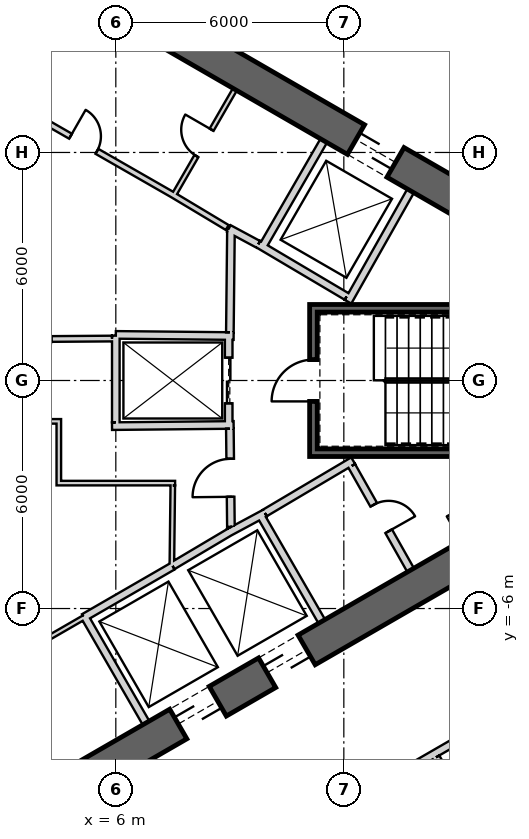
"""IFC4 building model, lengths in metres.
Left out: names, types, materials, properties, quantities, classifications, styles, units other than length and angle.
Written with IfcOpenShell. Run it as: python <this file> out.ifc"""

import sys

from ifc_helpers import new_model, si_unit, direction, frame, frame_2d, origin, place, context, subcontext, project, spatial, rectangle, extrude, element, fill, save


model = new_model("IFC4")
c1 = context("Model", 3, precision=1e-05, world=origin(), true_north=direction((0.0, 1.0)))
c2 = subcontext(c1, "Body", "Model", "MODEL_VIEW")
j1 = project(units=[si_unit("LENGTHUNIT", "METRE"), si_unit("PLANEANGLEUNIT", "RADIAN")], contexts=[c1])
p1 = place(None, origin())
s1 = spatial("IfcSite", under=j1, at=p1, CompositionType="ELEMENT")
p2 = place(p1, origin())
s2 = spatial("IfcBuilding", under=s1, at=p2, CompositionType="ELEMENT")
p3 = place(p2, frame((0.0, 0.0, 333.8)))
s3 = spatial("IfcBuildingStorey", under=s2, at=p3, CompositionType="ELEMENT", Elevation=333.8)
p4 = place(p3, frame((19.475, 2.208, 0.0), z_axis=(0.0, 0.0, 1.0), x_axis=(-0.866028369851, 0.499994862586, 0.0)))
e1 = element("IfcWall", 1, at=p4, inside=s3, PredefinedType="SHEAR", context=c2, shape_type="SweptSolid", body=[
    extrude(rectangle(XDim=31.523, YDim=0.9, at=frame_2d((15.762, 0.0))), origin(), (0.0, 0.0, 1.0), 3.9),
])
p5 = place(p4, frame((7.062, 0.0, 0.0)))
e2 = element("IfcOpeningElement", 2, at=p5, cuts=e1, PredefinedType="OPENING", context=c2, shape_type="SweptSolid", body=[
    extrude(rectangle(XDim=1.2, YDim=2.4, at=frame_2d((0.6, 1.2))), frame((0.0, 0.46, 0.0), z_axis=(0.0, -1.0, 0.0), x_axis=(1.0, 0.0, 0.0)), (0.0, 0.0, 1.0), 0.92),
])
p6 = place(p4, frame((3.612, 0.0, 0.0)))
e3 = element("IfcOpeningElement", 3, at=p6, cuts=e1, PredefinedType="OPENING", context=c2, shape_type="SweptSolid", body=[
    extrude(rectangle(XDim=1.2, YDim=2.4, at=frame_2d((0.6, 1.2))), frame((0.0, 0.46, 0.0), z_axis=(0.0, -1.0, 0.0), x_axis=(1.0, 0.0, 0.0)), (0.0, 0.0, 1.0), 0.92),
])
p7 = place(p4, frame((26.712, 0.0, 0.0)))
e4 = element("IfcOpeningElement", 4, at=p7, cuts=e1, PredefinedType="OPENING", context=c2, shape_type="SweptSolid", body=[
    extrude(rectangle(XDim=1.2, YDim=2.4, at=frame_2d((0.6, 1.2))), frame((0.0, 0.46, 0.0), z_axis=(0.0, -1.0, 0.0), x_axis=(1.0, 0.0, 0.0)), (0.0, 0.0, 1.0), 0.92),
])
p8 = place(p3, frame((-7.825, -17.97, 0.0), z_axis=(0.0, 0.0, 1.0), x_axis=(0.866028369851, 0.499994862586, 0.0)))
e5 = element("IfcWall", 5, at=p8, inside=s3, PredefinedType="SHEAR", context=c2, shape_type="SweptSolid", body=[
    extrude(rectangle(XDim=31.523, YDim=0.9, at=frame_2d((15.762, 0.0))), origin(), (0.0, 0.0, 1.0), 3.9),
])
p9 = place(p8, frame((17.862, 0.0, 0.0)))
e6 = element("IfcOpeningElement", 6, at=p9, cuts=e5, PredefinedType="OPENING", context=c2, shape_type="SweptSolid", body=[
    extrude(rectangle(XDim=1.2, YDim=2.4, at=frame_2d((0.6, 1.2))), frame((0.0, 0.46, 0.0), z_axis=(0.0, -1.0, 0.0), x_axis=(1.0, 0.0, 0.0)), (0.0, 0.0, 1.0), 0.92),
])
p10 = place(p8, frame((20.562, 0.0, 0.0)))
e7 = element("IfcOpeningElement", 7, at=p10, cuts=e5, PredefinedType="OPENING", context=c2, shape_type="SweptSolid", body=[
    extrude(rectangle(XDim=1.2, YDim=2.4, at=frame_2d((0.6, 1.2))), frame((0.0, 0.46, 0.0), z_axis=(0.0, -1.0, 0.0), x_axis=(1.0, 0.0, 0.0)), (0.0, 0.0, 1.0), 0.92),
])
p11 = place(p8, frame((26.712, 0.0, 0.0)))
e8 = element("IfcOpeningElement", 8, at=p11, cuts=e5, PredefinedType="OPENING", context=c2, shape_type="SweptSolid", body=[
    extrude(rectangle(XDim=1.2, YDim=2.4, at=frame_2d((0.6, 1.2))), frame((0.0, 0.46, 0.0), z_axis=(0.0, -1.0, 0.0), x_axis=(1.0, 0.0, 0.0)), (0.0, 0.0, 1.0), 0.92),
])
p12 = place(p8, frame((3.612, 0.0, 0.0)))
e9 = element("IfcOpeningElement", 9, at=p12, cuts=e5, PredefinedType="OPENING", context=c2, shape_type="SweptSolid", body=[
    extrude(rectangle(XDim=1.2, YDim=2.4, at=frame_2d((0.6, 1.2))), frame((0.0, 0.46, 0.0), z_axis=(0.0, -1.0, 0.0), x_axis=(1.0, 0.0, 0.0)), (0.0, 0.0, 1.0), 0.92),
])
p13 = place(p3, frame((9.847, 3.495, 0.0), z_axis=(0.0, 0.0, 1.0), x_axis=(0.499984717929, 0.866034226713, 0.0)))
e10 = element("IfcWall", 10, at=p13, inside=s3, PredefinedType="PLUMBINGWALL", context=c2, shape_type="SweptSolid", body=[
    extrude(rectangle(XDim=3.25, YDim=0.2, at=frame_2d((1.625, 0.0))), origin(), (0.0, 0.0, 1.0), 3.6),
])
p14 = place(p3, frame((12.11, 2.073, 0.0), z_axis=(0.0, 0.0, 1.0), x_axis=(0.49196600604, 0.870614408852, 0.0)))
e11 = element("IfcWall", 11, at=p14, inside=s3, PredefinedType="PLUMBINGWALL", context=c2, shape_type="SweptSolid", body=[
    extrude(rectangle(XDim=3.35, YDim=0.2, at=frame_2d((1.675, 0.0))), origin(), (0.0, 0.0, 1.0), 3.6),
])
p15 = place(p3, frame((12.073, 2.211, 0.0), z_axis=(0.0, 0.0, 1.0), x_axis=(-0.860414880418, 0.509594185166, 0.0)))
e12 = element("IfcWall", 12, at=p15, inside=s3, PredefinedType="PLUMBINGWALL", context=c2, shape_type="SweptSolid", body=[
    extrude(rectangle(XDim=2.7, YDim=0.2, at=frame_2d((1.35, 0.0))), origin(), (0.0, 0.0, 1.0), 3.6),
])
p16 = place(p3, frame((6.795, -9.01, 0.0), z_axis=(0.0, 0.0, 1.0), x_axis=(-0.499984717929, 0.866034226713, 0.0)))
e13 = element("IfcWall", 13, at=p16, inside=s3, PredefinedType="PLUMBINGWALL", context=c2, shape_type="SweptSolid", body=[
    extrude(rectangle(XDim=3.25, YDim=0.2, at=frame_2d((1.625, 0.0))), origin(), (0.0, 0.0, 1.0), 3.6),
])
p17 = place(p3, frame((5.159, -6.236, 0.0), z_axis=(0.0, 0.0, 1.0), x_axis=(0.866036505625, 0.499980770555, 0.0)))
e14 = element("IfcWall", 14, at=p17, inside=s3, PredefinedType="PLUMBINGWALL", context=c2, shape_type="SweptSolid", body=[
    extrude(rectangle(XDim=2.7, YDim=0.2, at=frame_2d((1.35, 0.0))), origin(), (0.0, 0.0, 1.0), 3.6),
])
p18 = place(p3, frame((9.795, -3.525, 0.0), z_axis=(0.0, 0.0, 1.0), x_axis=(0.499984717929, -0.866034226713, 0.0)))
e15 = element("IfcWall", 15, at=p18, inside=s3, PredefinedType="PLUMBINGWALL", context=c2, shape_type="SweptSolid", body=[
    extrude(rectangle(XDim=3.25, YDim=0.2, at=frame_2d((1.625, 0.0))), origin(), (0.0, 0.0, 1.0), 3.6),
])
p19 = place(p3, frame((8.974, -3.999, 0.0), z_axis=(0.0, 0.0, 1.0), x_axis=(0.880907015104, 0.473289373154, 0.0)))
e16 = element("IfcWall", 16, at=p19, inside=s3, PredefinedType="PLUMBINGWALL", context=c2, shape_type="SweptSolid", body=[
    extrude(rectangle(XDim=1.078, YDim=0.2, at=frame_2d((0.539, 0.0))), origin(), (0.0, 0.0, 1.0), 3.6),
])
p20 = place(p3, frame((7.493, -4.878, 0.0), z_axis=(0.0, 0.0, 1.0), x_axis=(0.859981807212, 0.510324691999, 0.0)))
e17 = element("IfcWall", 17, at=p20, inside=s3, PredefinedType="PLUMBINGWALL", context=c2, shape_type="SweptSolid", body=[
    extrude(rectangle(XDim=1.845, YDim=0.2, at=frame_2d((0.922, 0.0))), origin(), (0.0, 0.0, 1.0), 3.6),
])
p21 = place(p3, frame((19.2, 1.9, -0.3), z_axis=(0.0, 0.0, 1.0), x_axis=(-1.0, 0.0, 0.0)))
e18 = element("IfcWall", 18, at=p21, inside=s3, PredefinedType="SHEAR", context=c2, shape_type="SweptSolid", body=[
    extrude(rectangle(XDim=8.1, YDim=0.2, at=frame_2d((4.05, 0.0))), origin(), (0.0, 0.0, 1.0), 3.9),
])
p22 = place(p3, frame((11.1, -1.9, -0.3), z_axis=(0.0, 0.0, 1.0), x_axis=(1.0, 0.0, 0.0)))
e19 = element("IfcWall", 19, at=p22, inside=s3, PredefinedType="SHEAR", context=c2, shape_type="SweptSolid", body=[
    extrude(rectangle(XDim=7.9, YDim=0.2, at=frame_2d((3.95, 0.0))), origin(), (0.0, 0.0, 1.0), 3.9),
])
p23 = place(p3, frame((11.2, -1.8, -0.3), z_axis=(0.0, 0.0, 1.0), x_axis=(0.0, 1.0, 0.0)))
e20 = element("IfcWall", 20, at=p23, inside=s3, PredefinedType="SHEAR", context=c2, shape_type="SweptSolid", body=[
    extrude(rectangle(XDim=3.6, YDim=0.2, at=frame_2d((1.8, 0.0))), origin(), (0.0, 0.0, 1.0), 3.9),
])
p24 = place(p23, frame((1.25, 0.0, 0.3)))
e21 = element("IfcOpeningElement", 21, at=p24, cuts=e20, PredefinedType="OPENING", context=c2, shape_type="SweptSolid", body=[
    extrude(rectangle(XDim=1.1, YDim=2.1, at=frame_2d((0.55, 1.05))), frame((0.0, 0.11, 0.0), z_axis=(0.0, -1.0, 0.0), x_axis=(1.0, 0.0, 0.0)), (0.0, 0.0, 1.0), 0.22),
])
p25 = place(p3, frame((8.97, 1.2, 0.0), z_axis=(0.0, 0.0, 1.0), x_axis=(0.0, -1.0, 0.0)))
e22 = element("IfcWall", 22, at=p25, inside=s3, PredefinedType="PLUMBINGWALL", context=c2, shape_type="SweptSolid", body=[
    extrude(rectangle(XDim=2.4, YDim=0.2, at=frame_2d((1.2, 0.0))), origin(), (0.0, 0.0, 1.0), 3.6),
])
p26 = place(p25, frame((0.6, 0.0, 0.0)))
e23 = element("IfcOpeningElement", 23, at=p26, cuts=e22, PredefinedType="OPENING", context=c2, shape_type="SweptSolid", body=[
    extrude(rectangle(XDim=1.2, YDim=2.4, at=frame_2d((0.6, 1.2))), frame((0.0, 0.11, 0.0), z_axis=(0.0, -1.0, 0.0), x_axis=(1.0, 0.0, 0.0)), (0.0, 0.0, 1.0), 0.22),
])
p27 = place(p3, frame((6.0, 1.2, 0.0), z_axis=(0.0, 0.0, 1.0), x_axis=(0.999949988, -0.010001074852, 0.0)))
e24 = element("IfcWall", 24, at=p27, inside=s3, PredefinedType="PLUMBINGWALL", context=c2, shape_type="SweptSolid", body=[
    extrude(rectangle(XDim=3.1, YDim=0.2, at=frame_2d((1.55, 0.0))), origin(), (0.0, 0.0, 1.0), 3.6),
])
p28 = place(p3, frame((5.9, -1.201, 0.0), z_axis=(0.0, 0.0, 1.0), x_axis=(0.999950064753, 0.009993397809, 0.0)))
e25 = element("IfcWall", 25, at=p28, inside=s3, PredefinedType="PLUMBINGWALL", context=c2, shape_type="SweptSolid", body=[
    extrude(rectangle(XDim=3.2, YDim=0.2, at=frame_2d((1.6, 0.0))), origin(), (0.0, 0.0, 1.0), 3.6),
])
p29 = place(p3, frame((6.0, -1.1, 0.0), z_axis=(0.0, 0.0, 1.0), x_axis=(0.0, 1.0, 0.0)))
e26 = element("IfcWall", 26, at=p29, inside=s3, PredefinedType="PLUMBINGWALL", context=c2, shape_type="SweptSolid", body=[
    extrude(rectangle(XDim=2.28, YDim=0.2, at=frame_2d((1.14, 0.0))), origin(), (0.0, 0.0, 1.0), 3.6),
])
p30 = place(p3, frame((7.508, 4.845, 0.0), z_axis=(0.0, 0.0, 1.0), x_axis=(0.500017246033, 0.866015446554, 0.0)))
e27 = element("IfcWall", 27, at=p30, inside=s3, PredefinedType="PARTITIONING", context=c2, shape_type="SweptSolid", body=[
    extrude(rectangle(XDim=3.25, YDim=0.12, at=frame_2d((1.625, 0.0))), origin(), (0.0, 0.0, 1.0), 3.6),
])
p31 = place(p30, frame((1.225, 0.0, 0.0)))
e28 = element("IfcOpeningElement", 28, at=p31, cuts=e27, PredefinedType="OPENING", context=c2, shape_type="SweptSolid", body=[
    extrude(rectangle(XDim=0.8, YDim=2.1, at=frame_2d((0.4, 1.05))), frame((0.0, 0.07, 0.0), z_axis=(0.0, -1.0, 0.0), x_axis=(1.0, 0.0, 0.0)), (0.0, 0.0, 1.0), 0.14),
])
p32 = place(p3, frame((8.974, 3.999, 0.0), z_axis=(0.0, 0.0, 1.0), x_axis=(0.880917147855, -0.473270513147, 0.0)))
e29 = element("IfcWall", 29, at=p32, inside=s3, PredefinedType="PARTITIONING", context=c2, shape_type="SweptSolid", body=[
    extrude(rectangle(XDim=0.878, YDim=0.2, at=frame_2d((0.439, 0.0))), origin(), (0.0, 0.0, 1.0), 3.6),
])
p33 = place(p3, frame((8.931, 4.026, 0.0), z_axis=(0.0, 0.0, 1.0), x_axis=(-0.857531586833, 0.514431314738, 0.0)))
e30 = element("IfcWall", 30, at=p33, inside=s3, PredefinedType="PLUMBINGWALL", context=c2, shape_type="SweptSolid", body=[
    extrude(rectangle(XDim=1.671, YDim=0.15, at=frame_2d((0.836, 0.0))), origin(), (0.0, 0.0, 1.0), 3.6),
])
p34 = place(p3, frame((2.832, 7.545, 0.0), z_axis=(0.0, 0.0, 1.0), x_axis=(0.500017246033, 0.866015446554, 0.0)))
e31 = element("IfcWall", 31, at=p34, inside=s3, PredefinedType="PARTITIONING", context=c2, shape_type="SweptSolid", body=[
    extrude(rectangle(XDim=3.25, YDim=0.12, at=frame_2d((1.625, 0.0))), origin(), (0.0, 0.0, 1.0), 3.6),
])
p35 = place(p34, frame((1.225, 0.0, 0.0)))
e32 = element("IfcOpeningElement", 32, at=p35, cuts=e31, PredefinedType="OPENING", context=c2, shape_type="SweptSolid", body=[
    extrude(rectangle(XDim=0.8, YDim=2.1, at=frame_2d((0.4, 1.05))), frame((0.0, 0.07, 0.0), z_axis=(0.0, -1.0, 0.0), x_axis=(1.0, 0.0, 0.0)), (0.0, 0.0, 1.0), 0.14),
])
p36 = place(p3, frame((7.497, 4.886, 0.0), z_axis=(0.0, 0.0, 1.0), x_axis=(-0.867541725638, 0.497364407931, 0.0)))
e33 = element("IfcWall", 33, at=p36, inside=s3, PredefinedType="PLUMBINGWALL", context=c2, shape_type="SweptSolid", body=[
    extrude(rectangle(XDim=9.822, YDim=0.15, at=frame_2d((4.911, 0.0))), origin(), (0.0, 0.0, 1.0), 3.6),
])
p37 = place(p36, frame((2.3, 0.0, 0.0)))
e34 = element("IfcOpeningElement", 34, at=p37, cuts=e33, PredefinedType="OPENING", context=c2, shape_type="SweptSolid", body=[
    extrude(rectangle(XDim=0.8, YDim=2.1, at=frame_2d((0.4, 1.05))), frame((0.0, 0.085, 0.0), z_axis=(0.0, -1.0, 0.0), x_axis=(1.0, 0.0, 0.0)), (0.0, 0.0, 1.0), 0.17),
])
p38 = place(p3, frame((0.483, -8.936, 0.0), z_axis=(0.0, 0.0, 1.0), x_axis=(0.866028230842, 0.499995103361, 0.0)))
e35 = element("IfcWall", 35, at=p38, inside=s3, PredefinedType="PARTITIONING", context=c2, shape_type="SweptSolid", body=[
    extrude(rectangle(XDim=5.4, YDim=0.12, at=frame_2d((2.7, 0.0))), origin(), (0.0, 0.0, 1.0), 3.6),
])
p39 = place(p38, frame((2.3, 0.0, 0.0)))
e36 = element("IfcOpeningElement", 36, at=p39, cuts=e35, PredefinedType="OPENING", context=c2, shape_type="SweptSolid", body=[
    extrude(rectangle(XDim=0.8, YDim=2.1, at=frame_2d((0.4, 1.05))), frame((0.0, 0.07, 0.0), z_axis=(0.0, -1.0, 0.0), x_axis=(1.0, 0.0, 0.0)), (0.0, 0.0, 1.0), 0.14),
])
p40 = place(p3, frame((12.245, -2.109, 0.0), z_axis=(0.0, 0.0, 1.0), x_axis=(-0.860414880418, -0.509594185166, 0.0)))
e37 = element("IfcWall", 37, at=p40, inside=s3, PredefinedType="PARTITIONING", context=c2, shape_type="SweptSolid", body=[
    extrude(rectangle(XDim=2.7, YDim=0.2, at=frame_2d((1.35, 0.0))), origin(), (0.0, 0.0, 1.0), 3.6),
])
p41 = place(p3, frame((13.758, -4.99, 0.0), z_axis=(0.0, 0.0, 1.0), x_axis=(-0.491993409184, 0.87059892334, 0.0)))
e38 = element("IfcWall", 38, at=p41, inside=s3, PredefinedType="PARTITIONING", context=c2, shape_type="SweptSolid", body=[
    extrude(rectangle(XDim=3.15, YDim=0.2, at=frame_2d((1.575, 0.0))), origin(), (0.0, 0.0, 1.0), 3.6),
])
p42 = place(p41, frame((1.175, 0.0, 0.0)))
e39 = element("IfcOpeningElement", 39, at=p42, cuts=e38, PredefinedType="OPENING", context=c2, shape_type="SweptSolid", body=[
    extrude(rectangle(XDim=0.8, YDim=2.1, at=frame_2d((0.4, 1.05))), frame((0.0, 0.11, 0.0), z_axis=(0.0, -1.0, 0.0), x_axis=(1.0, 0.0, 0.0)), (0.0, 0.0, 1.0), 0.22),
])
p43 = place(p3, frame((9.001, 1.27, 0.0), z_axis=(0.0, 0.0, 1.0), x_axis=(0.010751103362, 0.999942205218, 0.0)))
e40 = element("IfcWall", 40, at=p43, inside=s3, PredefinedType="PARTITIONING", context=c2, shape_type="SweptSolid", body=[
    extrude(rectangle(XDim=2.725, YDim=0.2, at=frame_2d((1.363, 0.0))), origin(), (0.0, 0.0, 1.0), 3.6),
])
p44 = place(p3, frame((9.029, -3.851, 0.0), z_axis=(0.0, 0.0, 1.0), x_axis=(-0.010783593937, 0.99994185536, 0.0)))
e41 = element("IfcWall", 41, at=p44, inside=s3, PredefinedType="PARTITIONING", context=c2, shape_type="SweptSolid", body=[
    extrude(rectangle(XDim=2.581, YDim=0.2, at=frame_2d((1.291, 0.0))), origin(), (0.0, 0.0, 1.0), 3.6),
])
p45 = place(p44, frame((0.791, 0.0, 0.0)))
e42 = element("IfcOpeningElement", 42, at=p45, cuts=e41, PredefinedType="OPENING", context=c2, shape_type="SweptSolid", body=[
    extrude(rectangle(XDim=1.0, YDim=2.1, at=frame_2d((0.5, 1.05))), frame((0.0, 0.11, 0.0), z_axis=(0.0, -1.0, 0.0), x_axis=(1.0, 0.0, 0.0)), (0.0, 0.0, 1.0), 0.22),
])
p46 = place(p3, frame((1.778, 1.074, 0.0), z_axis=(0.0, 0.0, 1.0), x_axis=(0.999973898196, 0.007225159347, 0.0)))
e43 = element("IfcWall", 43, at=p46, inside=s3, PredefinedType="PLUMBINGWALL", context=c2, shape_type="SweptSolid", body=[
    extrude(rectangle(XDim=4.122, YDim=0.15, at=frame_2d((2.061, 0.0))), origin(), (0.0, 0.0, 1.0), 3.6),
])
p47 = place(p46, frame((1.725, 0.0, 0.0)))
e44 = element("IfcOpeningElement", 44, at=p47, cuts=e43, PredefinedType="OPENING", context=c2, shape_type="SweptSolid", body=[
    extrude(rectangle(XDim=0.8, YDim=2.1, at=frame_2d((0.4, 1.05))), frame((0.0, 0.085, 0.0), z_axis=(0.0, -1.0, 0.0), x_axis=(1.0, 0.0, 0.0)), (0.0, 0.0, 1.0), 0.17),
])
p48 = place(p3, frame((4.56, -1.075, 0.0), z_axis=(0.0, 0.0, 1.0), x_axis=(-1.0, 0.0, 0.0)))
e45 = element("IfcWall", 45, at=p48, inside=s3, PredefinedType="PARTITIONING", context=c2, shape_type="SweptSolid", body=[
    extrude(rectangle(XDim=2.636, YDim=0.12, at=frame_2d((1.318, 0.0))), origin(), (0.0, 0.0, 1.0), 3.6),
])
p49 = place(p3, frame((4.5, -2.76, 0.0), z_axis=(0.0, 0.0, 1.0), x_axis=(0.0, 1.0, 0.0)))
e46 = element("IfcWall", 46, at=p49, inside=s3, PredefinedType="PARTITIONING", context=c2, shape_type="SweptSolid", body=[
    extrude(rectangle(XDim=1.625, YDim=0.12, at=frame_2d((0.812, 0.0))), origin(), (0.0, 0.0, 1.0), 3.6),
])
p50 = place(p3, frame((7.56, -2.7, 0.0), z_axis=(0.0, 0.0, 1.0), x_axis=(-1.0, 0.0, 0.0)))
e47 = element("IfcWall", 47, at=p50, inside=s3, PredefinedType="PARTITIONING", context=c2, shape_type="SweptSolid", body=[
    extrude(rectangle(XDim=3.0, YDim=0.12, at=frame_2d((1.5, 0.0))), origin(), (0.0, 0.0, 1.0), 3.6),
])
p51 = place(p3, frame((7.475, -4.865, 0.0), z_axis=(0.0, 0.0, 1.0), x_axis=(0.011716133148, 0.999931363757, 0.0)))
e48 = element("IfcWall", 48, at=p51, inside=s3, PredefinedType="PARTITIONING", context=c2, shape_type="SweptSolid", body=[
    extrude(rectangle(XDim=2.105, YDim=0.12, at=frame_2d((1.052, 0.0))), origin(), (0.0, 0.0, 1.0), 3.6),
])
p52 = place(p3, frame((16.523, 8.358, 0.0), z_axis=(0.0, 0.0, 1.0), x_axis=(-0.866025545866, 0.499999753908, 0.0)))
e49 = element("IfcWall", 49, at=p52, inside=s3, PredefinedType="PARTITIONING", context=c2, shape_type="SweptSolid", body=[
    extrude(rectangle(XDim=26.471, YDim=0.2, at=frame_2d((13.235, 0.0))), origin(), (0.0, 0.0, 1.0), 2.97),
])
p53 = place(p52, frame((21.568, 0.0, 0.0)))
e50 = element("IfcOpeningElement", 50, at=p53, cuts=e49, PredefinedType="OPENING", context=c2, shape_type="SweptSolid", body=[
    extrude(rectangle(XDim=1.0, YDim=2.1, at=frame_2d((0.5, 1.05))), frame((0.0, 0.11, 0.0), z_axis=(0.0, -1.0, 0.0), x_axis=(1.0, 0.0, 0.0)), (0.0, 0.0, 1.0), 0.22),
])
p54 = place(p52, frame((8.333, 0.0, 0.0)))
e51 = element("IfcOpeningElement", 51, at=p54, cuts=e49, PredefinedType="OPENING", context=c2, shape_type="SweptSolid", body=[
    extrude(rectangle(XDim=1.0, YDim=2.1, at=frame_2d((0.5, 1.05))), frame((0.0, 0.11, 0.0), z_axis=(0.0, -1.0, 0.0), x_axis=(1.0, 0.0, 0.0)), (0.0, 0.0, 1.0), 0.22),
])
p55 = place(p3, frame((-6.505, -21.885, 0.0), z_axis=(0.0, 0.0, 1.0), x_axis=(0.86602457258, 0.500001439686, 0.0)))
e52 = element("IfcWall", 52, at=p55, inside=s3, PredefinedType="PARTITIONING", context=c2, shape_type="SweptSolid", body=[
    extrude(rectangle(XDim=32.952, YDim=0.2, at=frame_2d((16.476, 0.0))), origin(), (0.0, 0.0, 1.0), 2.97),
])
p56 = place(p55, frame((28.061, 0.0, 0.0)))
e53 = element("IfcOpeningElement", 53, at=p56, cuts=e52, PredefinedType="OPENING", context=c2, shape_type="SweptSolid", body=[
    extrude(rectangle(XDim=1.0, YDim=2.1, at=frame_2d((0.5, 1.05))), frame((0.0, 0.11, 0.0), z_axis=(0.0, -1.0, 0.0), x_axis=(1.0, 0.0, 0.0)), (0.0, 0.0, 1.0), 0.22),
])
p57 = place(p55, frame((16.137, 0.0, 0.0)))
e54 = element("IfcOpeningElement", 54, at=p57, cuts=e52, PredefinedType="OPENING", context=c2, shape_type="SweptSolid", body=[
    extrude(rectangle(XDim=1.0, YDim=2.1, at=frame_2d((0.5, 1.05))), frame((0.0, 0.11, 0.0), z_axis=(0.0, -1.0, 0.0), x_axis=(1.0, 0.0, 0.0)), (0.0, 0.0, 1.0), 0.22),
])
p58 = place(p55, frame((4.101, 0.0, 0.0)))
e55 = element("IfcOpeningElement", 55, at=p58, cuts=e52, PredefinedType="OPENING", context=c2, shape_type="SweptSolid", body=[
    extrude(rectangle(XDim=1.0, YDim=2.1, at=frame_2d((0.5, 1.05))), frame((0.0, 0.11, 0.0), z_axis=(0.0, -1.0, 0.0), x_axis=(1.0, 0.0, 0.0)), (0.0, 0.0, 1.0), 0.22),
])
p59 = place(p3, frame((14.425, -9.916, 0.0), z_axis=(0.0, 0.0, 1.0), x_axis=(0.499943167381, -0.866058213626, 0.0)))
e56 = element("IfcWall", 56, at=p59, inside=s3, PredefinedType="PARTITIONING", context=c2, shape_type="SweptSolid", body=[
    extrude(rectangle(XDim=11.458, YDim=0.2, at=frame_2d((5.729, 0.0))), origin(), (0.0, 0.0, 1.0), 3.07),
])
p60 = place(p24, origin())
e57 = element("IfcDoor", 57, at=p60, inside=s3, OperationType="SINGLE_SWING_RIGHT", PredefinedType="USERDEFINED", context=c2, shape_type="SweptSolid", body=[
    extrude(rectangle(XDim=1.1, YDim=2.1, at=frame_2d((0.55, 1.05))), frame((0.0, 0.025, 0.0), z_axis=(0.0, -1.0, 0.0), x_axis=(1.0, 0.0, 0.0)), (0.0, 0.0, 1.0), 0.05),
])
fill(e21, e57)
p61 = place(p45, origin())
e58 = element("IfcDoor", 58, at=p61, inside=s3, OperationType="SINGLE_SWING_RIGHT", PredefinedType="USERDEFINED", context=c2, shape_type="SweptSolid", body=[
    extrude(rectangle(XDim=1.0, YDim=2.1, at=frame_2d((0.5, 1.05))), frame((0.0, 0.025, 0.0), z_axis=(0.0, -1.0, 0.0), x_axis=(1.0, 0.0, 0.0)), (0.0, 0.0, 1.0), 0.05),
])
fill(e42, e58)
p62 = place(p26, origin())
e59 = element("IfcDoor", 59, at=p62, inside=s3, OperationType="SLIDING_TO_LEFT", PredefinedType="USERDEFINED", context=c2, shape_type="SweptSolid", body=[
    extrude(rectangle(XDim=1.2, YDim=2.4, at=frame_2d((0.6, 1.2))), frame((0.0, 0.025, 0.0), z_axis=(0.0, -1.0, 0.0), x_axis=(1.0, 0.0, 0.0)), (0.0, 0.0, 1.0), 0.05),
])
fill(e23, e59)
p63 = place(p31, origin())
e60 = element("IfcDoor", 60, at=p63, inside=s3, OperationType="SINGLE_SWING_LEFT", PredefinedType="USERDEFINED", context=c2, shape_type="SweptSolid", body=[
    extrude(rectangle(XDim=0.8, YDim=2.1, at=frame_2d((0.4, 1.05))), frame((0.0, 0.025, 0.0), z_axis=(0.0, -1.0, 0.0), x_axis=(1.0, 0.0, 0.0)), (0.0, 0.0, 1.0), 0.05),
])
fill(e28, e60)
p64 = place(p42, origin())
e61 = element("IfcDoor", 61, at=p64, inside=s3, OperationType="SINGLE_SWING_RIGHT", PredefinedType="USERDEFINED", context=c2, shape_type="SweptSolid", body=[
    extrude(rectangle(XDim=0.8, YDim=2.1, at=frame_2d((0.4, 1.05))), frame((0.0, 0.025, 0.0), z_axis=(0.0, -1.0, 0.0), x_axis=(1.0, 0.0, 0.0)), (0.0, 0.0, 1.0), 0.05),
])
fill(e39, e61)
p65 = place(p37, origin())
e62 = element("IfcDoor", 62, at=p65, inside=s3, OperationType="SINGLE_SWING_LEFT", PredefinedType="USERDEFINED", context=c2, shape_type="SweptSolid", body=[
    extrude(rectangle(XDim=0.8, YDim=2.1, at=frame_2d((0.4, 1.05))), frame((0.0, 0.025, 0.0), z_axis=(0.0, -1.0, 0.0), x_axis=(1.0, 0.0, 0.0)), (0.0, 0.0, 1.0), 0.05),
])
fill(e34, e62)
p66 = place(p5, origin())
e63 = element("IfcDoor", 63, at=p66, inside=s3, OperationType="SLIDING_TO_LEFT", PredefinedType="USERDEFINED", context=c2, shape_type="SweptSolid", body=[
    extrude(rectangle(XDim=1.2, YDim=2.4, at=frame_2d((0.6, 1.2))), frame((0.0, 0.025, 0.0), z_axis=(0.0, -1.0, 0.0), x_axis=(1.0, 0.0, 0.0)), (0.0, 0.0, 1.0), 0.05),
])
fill(e2, e63)
p67 = place(p9, origin())
e64 = element("IfcDoor", 64, at=p67, inside=s3, OperationType="SLIDING_TO_LEFT", PredefinedType="USERDEFINED", context=c2, shape_type="SweptSolid", body=[
    extrude(rectangle(XDim=1.2, YDim=2.4, at=frame_2d((0.6, 1.2))), frame((0.0, 0.025, 0.0), z_axis=(0.0, -1.0, 0.0), x_axis=(1.0, 0.0, 0.0)), (0.0, 0.0, 1.0), 0.05),
])
fill(e6, e64)
p68 = place(p10, origin())
e65 = element("IfcDoor", 65, at=p68, inside=s3, OperationType="SLIDING_TO_LEFT", PredefinedType="USERDEFINED", context=c2, shape_type="SweptSolid", body=[
    extrude(rectangle(XDim=1.2, YDim=2.4, at=frame_2d((0.6, 1.2))), frame((0.0, 0.025, 0.0), z_axis=(0.0, -1.0, 0.0), x_axis=(1.0, 0.0, 0.0)), (0.0, 0.0, 1.0), 0.05),
])
fill(e7, e65)
save(model, sys.argv[1])
